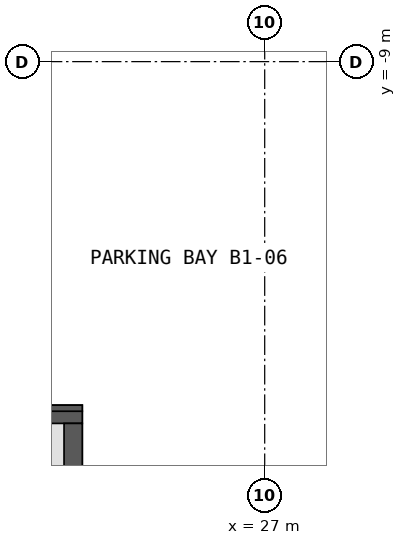
"""IFC4 building model, lengths in metres.
Left out: names, types, materials, properties, quantities, classifications, styles, units other than length and angle.
Written with IfcOpenShell. Run it as: python <this file> out.ifc"""

import sys

from ifc_helpers import new_model, si_unit, direction, frame, frame_2d, origin, place, context, subcontext, project, spatial, polyline, rectangle, outline, extrude, element, save


model = new_model("IFC4")
c1 = context("Model", 3, precision=1e-05, world=origin(), true_north=direction((0.0, 1.0)))
c2 = subcontext(c1, "Body", "Model", "MODEL_VIEW")
j1 = project(units=[si_unit("LENGTHUNIT", "METRE"), si_unit("PLANEANGLEUNIT", "RADIAN")], contexts=[c1])
p1 = place(None, origin())
s1 = spatial("IfcSite", under=j1, at=p1, CompositionType="ELEMENT")
p2 = place(p1, origin())
s2 = spatial("IfcBuilding", under=s1, at=p2, CompositionType="ELEMENT")
p3 = place(p2, frame((0.0, 0.0, -4.2)))
s3 = spatial("IfcBuildingStorey", under=s2, at=p3, CompositionType="ELEMENT", Elevation=-4.2)
p4 = place(p3, frame((28.154, -16.455, 0.0), z_axis=(0.0, 0.0, 1.0), x_axis=(0.499993492265, 0.866029160995, 0.0)))
e1 = element("IfcWall", 1, at=p4, inside=s3, PredefinedType="SOLIDWALL", context=c2, shape_type="SweptSolid", body=[
    extrude(rectangle(XDim=7.173, YDim=0.6, at=frame_2d((3.587, 0.0))), origin(), (0.0, 0.0, 1.0), 3.75),
])
p5 = place(p3, frame((31.74, -10.542, 0.0), z_axis=(0.0, 0.0, 1.0), x_axis=(-0.500000005698, 0.866025400495, 0.0)))
e2 = element("IfcWall", 2, at=p5, inside=s3, PredefinedType="SOLIDWALL", context=c2, shape_type="SweptSolid", body=[
    extrude(rectangle(XDim=50.0, YDim=0.6, at=frame_2d((25.0, 0.0))), origin(), (0.0, 0.0, 1.0), 3.75),
])
p6 = place(p3, frame((24.0, -14.8, 0.0), z_axis=(0.0, 0.0, 1.0), x_axis=(-1.0, 0.0, 0.0)))
e3 = element("IfcWall", 3, at=p6, inside=s3, PredefinedType="SHEAR", context=c2, shape_type="SweptSolid", body=[
    extrude(outline(polyline([(0.0, 0.0), (22.467, 0.0), (22.467, 0.3), (3.0, 3.549), (3.0, 3.544), (0.0, 3.799), (0.0, 0.0)])), frame((0.0, 0.15, 0.0), z_axis=(0.0, -1.0, 0.0), x_axis=(1.0, 0.0, 0.0)), (0.0, 0.0, 1.0), 0.3),
])
p7 = place(p3, frame((23.85, -14.95, 0.0), z_axis=(0.0, 0.0, 1.0), x_axis=(0.0, -1.0, 0.0)))
e4 = element("IfcWall", 4, at=p7, inside=s3, PredefinedType="SHEAR", context=c2, shape_type="SweptSolid", body=[
    extrude(rectangle(XDim=5.4, YDim=0.3, at=frame_2d((2.7, 0.0))), origin(), (0.0, 0.0, 1.0), 3.799),
])
save(model, sys.argv[1])
